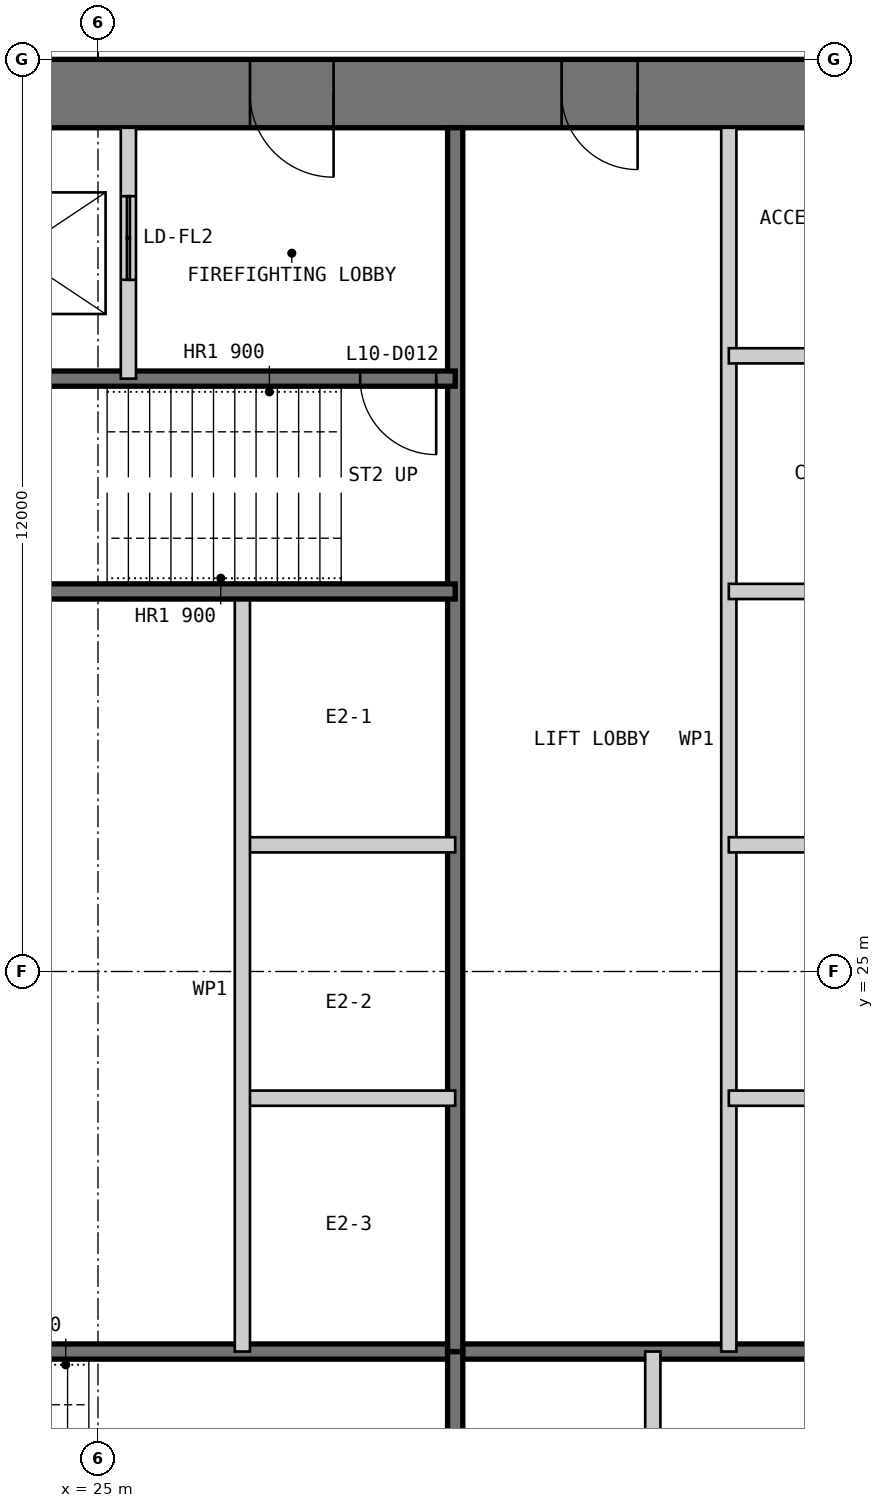
"""IFC4 building model, lengths in metres.
Left out: names, types, materials, properties, quantities, classifications, styles, units other than length and angle.
Written with IfcOpenShell. Run it as: python <this file> out.ifc"""

import sys

from ifc_helpers import new_model, si_unit, direction, frame, frame_2d, origin, place, context, subcontext, project, spatial, polyline, rectangle, outline, extrude, element, fill, save


model = new_model("IFC4")
c1 = context("Model", 3, precision=1e-05, world=origin(), true_north=direction((0.0, 1.0)))
c2 = subcontext(c1, "Body", "Model", "MODEL_VIEW")
j1 = project(units=[si_unit("LENGTHUNIT", "METRE"), si_unit("PLANEANGLEUNIT", "RADIAN")], contexts=[c1])
p1 = place(None, origin())
s1 = spatial("IfcSite", under=j1, at=p1, CompositionType="ELEMENT")
p2 = place(p1, origin())
s2 = spatial("IfcBuilding", under=s1, at=p2, CompositionType="ELEMENT")
p3 = place(p2, frame((0.0, 0.0, 47.0)))
s3 = spatial("IfcBuildingStorey", under=s2, at=p3, CompositionType="ELEMENT", Elevation=47.0)
p4 = place(p3, frame((37.0, 36.55, 0.0), z_axis=(0.0, 0.0, 1.0), x_axis=(-1.0, 0.0, 0.0)))
e1 = element("IfcWall", 1, at=p4, inside=s3, PredefinedType="SHEAR", context=c2, shape_type="SweptSolid", body=[
    extrude(outline(polyline([(0.0, -0.45), (24.0, -0.45), (23.1, 0.45), (0.9, 0.45), (0.0, -0.45)])), origin(), (0.0, 0.0, 1.0), 4.0),
])
p5 = place(p4, frame((4.9, 0.0, 0.0)))
e2 = element("IfcOpeningElement", 2, at=p5, cuts=e1, PredefinedType="OPENING", context=c2, shape_type="SweptSolid", body=[
    extrude(rectangle(XDim=1.0, YDim=2.2, at=frame_2d((0.5, 1.1))), frame((0.0, 0.46, 0.0), z_axis=(0.0, -1.0, 0.0), x_axis=(1.0, 0.0, 0.0)), (0.0, 0.0, 1.0), 0.92),
])
p6 = place(p4, frame((8.9, 0.0, 0.0)))
e3 = element("IfcOpeningElement", 3, at=p6, cuts=e1, PredefinedType="OPENING", context=c2, shape_type="SweptSolid", body=[
    extrude(rectangle(XDim=1.1, YDim=2.2, at=frame_2d((0.55, 1.1))), frame((0.0, 0.46, 0.0), z_axis=(0.0, -1.0, 0.0), x_axis=(1.0, 0.0, 0.0)), (0.0, 0.0, 1.0), 0.92),
])
p7 = place(p4, frame((15.05, 0.0, 0.0)))
e4 = element("IfcOpeningElement", 4, at=p7, cuts=e1, PredefinedType="OPENING", context=c2, shape_type="SweptSolid", body=[
    extrude(rectangle(XDim=0.9, YDim=2.2, at=frame_2d((0.45, 1.1))), frame((0.0, 0.46, 0.0), z_axis=(0.0, -1.0, 0.0), x_axis=(1.0, 0.0, 0.0)), (0.0, 0.0, 1.0), 0.92),
])
p8 = place(p4, frame((17.9, 0.0, 0.0)))
e5 = element("IfcOpeningElement", 5, at=p8, cuts=e1, PredefinedType="OPENING", context=c2, shape_type="SweptSolid", body=[
    extrude(rectangle(XDim=1.0, YDim=2.2, at=frame_2d((0.5, 1.1))), frame((0.0, 0.46, 0.0), z_axis=(0.0, -1.0, 0.0), x_axis=(1.0, 0.0, 0.0)), (0.0, 0.0, 1.0), 0.92),
])
p9 = place(p4, frame((21.4, 0.0, 0.0)))
e6 = element("IfcOpeningElement", 6, at=p9, cuts=e1, PredefinedType="OPENING", context=c2, shape_type="SweptSolid", body=[
    extrude(rectangle(XDim=1.0, YDim=2.2, at=frame_2d((0.5, 1.1))), frame((0.0, 0.46, 0.0), z_axis=(0.0, -1.0, 0.0), x_axis=(1.0, 0.0, 0.0)), (0.0, 0.0, 1.0), 0.92),
])
p10 = place(p3, frame((20.3, 20.0, 0.0), z_axis=(0.0, 0.0, 1.0), x_axis=(1.0, 0.0, 0.0)))
e7 = element("IfcWall", 7, at=p10, inside=s3, PredefinedType="SOLIDWALL", context=c2, shape_type="SweptSolid", body=[
    extrude(rectangle(XDim=15.8, YDim=0.2, at=frame_2d((7.9, 0.0))), origin(), (0.0, 0.0, 1.0), 3.8),
])
p11 = place(p3, frame((29.7, 13.9, 0.0), z_axis=(0.0, 0.0, 1.0), x_axis=(0.0, 1.0, 0.0)))
e8 = element("IfcWall", 8, at=p11, inside=s3, PredefinedType="SOLIDWALL", context=c2, shape_type="SweptSolid", body=[
    extrude(rectangle(XDim=6.1, YDim=0.2, at=frame_2d((3.05, 0.0))), origin(), (0.0, 0.0, 1.0), 3.8),
])
p12 = place(p3, frame((32.3, 13.9, 0.0), z_axis=(0.0, 0.0, 1.0), x_axis=(0.0, 1.0, 0.0)))
e9 = element("IfcWall", 9, at=p12, inside=s3, PredefinedType="PARTITIONING", context=c2, shape_type="SweptSolid", body=[
    extrude(rectangle(XDim=6.1, YDim=0.2, at=frame_2d((3.05, 0.0))), origin(), (0.0, 0.0, 1.0), 3.8),
])
p13 = place(p3, frame((33.3, 36.1, 0.0), z_axis=(0.0, 0.0, 1.0), x_axis=(0.0, -1.0, 0.0)))
e10 = element("IfcWall", 10, at=p13, inside=s3, PredefinedType="PARTITIONING", context=c2, shape_type="SweptSolid", body=[
    extrude(rectangle(XDim=16.1, YDim=0.2, at=frame_2d((8.05, 0.0))), origin(), (0.0, 0.0, 1.0), 3.8),
])
p14 = place(p3, frame((29.7, 36.1, 0.0), z_axis=(0.0, 0.0, 1.0), x_axis=(0.0, -1.0, 0.0)))
e11 = element("IfcWall", 11, at=p14, inside=s3, PredefinedType="SOLIDWALL", context=c2, shape_type="SweptSolid", body=[
    extrude(rectangle(XDim=16.1, YDim=0.2, at=frame_2d((8.05, 0.0))), origin(), (0.0, 0.0, 1.0), 3.8),
])
for number, where, z_axis, x_axis in (
    (12, (36.1, 30.0, 0.0), (0.0, 0.0, 1.0), (-1.0, 0.0, 0.0)),
    (13, (36.1, 26.667, 0.0), (0.0, 0.0, 1.0), (-1.0, 0.0, 0.0)),
    (14, (36.1, 23.333, 0.0), (0.0, 0.0, 1.0), (-1.0, 0.0, 0.0)),
    (15, (29.7, 26.667, 0.0), (0.0, 0.0, 1.0), (-1.0, 0.0, 0.0)),
    (16, (29.7, 23.333, 0.0), (0.0, 0.0, 1.0), (-1.0, 0.0, 0.0)),
):
    element("IfcWall", number, at=place(p3, frame(where, z_axis=z_axis, x_axis=x_axis)), inside=s3, PredefinedType="PARTITIONING", context=c2, shape_type="SweptSolid", body=[
        extrude(rectangle(XDim=2.8, YDim=0.2, at=frame_2d((1.4, 0.0))), origin(), (0.0, 0.0, 1.0), 3.8),
    ])
p15 = place(p3, frame((26.9, 30.0, 0.0), z_axis=(0.0, 0.0, 1.0), x_axis=(0.0, -1.0, 0.0)))
e17 = element("IfcWall", 17, at=p15, inside=s3, PredefinedType="PARTITIONING", context=c2, shape_type="SweptSolid", body=[
    extrude(rectangle(XDim=10.0, YDim=0.2, at=frame_2d((5.0, 0.0))), origin(), (0.0, 0.0, 1.0), 3.8),
])
p16 = place(p3, frame((29.7, 32.8, 0.0), z_axis=(0.0, 0.0, 1.0), x_axis=(-1.0, 0.0, 0.0)))
e18 = element("IfcWall", 18, at=p16, inside=s3, PredefinedType="SOLIDWALL", context=c2, shape_type="SweptSolid", body=[
    extrude(rectangle(XDim=9.4, YDim=0.2, at=frame_2d((4.7, 0.0))), origin(), (0.0, 0.0, 1.0), 3.8),
])
p17 = place(p16, frame((0.25, 0.0, 0.0)))
e19 = element("IfcOpeningElement", 19, at=p17, cuts=e18, PredefinedType="OPENING", context=c2, shape_type="SweptSolid", body=[
    extrude(rectangle(XDim=1.0, YDim=2.2, at=frame_2d((0.5, 1.1))), frame((0.0, 0.11, 0.0), z_axis=(0.0, -1.0, 0.0), x_axis=(1.0, 0.0, 0.0)), (0.0, 0.0, 1.0), 0.22),
])
p18 = place(p3, frame((29.7, 30.0, 0.0), z_axis=(0.0, 0.0, 1.0), x_axis=(-1.0, 0.0, 0.0)))
e20 = element("IfcWall", 20, at=p18, inside=s3, PredefinedType="SOLIDWALL", context=c2, shape_type="SweptSolid", body=[
    extrude(rectangle(XDim=15.8, YDim=0.2, at=frame_2d((7.9, 0.0))), origin(), (0.0, 0.0, 1.0), 3.8),
])
p19 = place(p3, frame((25.4, 36.1, 0.0), z_axis=(0.0, 0.0, 1.0), x_axis=(0.0, -1.0, 0.0)))
e21 = element("IfcWall", 21, at=p19, inside=s3, PredefinedType="PARTITIONING", context=c2, shape_type="SweptSolid", body=[
    extrude(rectangle(XDim=3.3, YDim=0.2, at=frame_2d((1.65, 0.0))), origin(), (0.0, 0.0, 1.0), 3.8),
])
p20 = place(p19, frame((0.9, 0.0, 0.0)))
e22 = element("IfcOpeningElement", 22, at=p20, cuts=e21, PredefinedType="OPENING", context=c2, shape_type="SweptSolid", body=[
    extrude(rectangle(XDim=1.1, YDim=2.2, at=frame_2d((0.55, 1.1))), frame((0.0, 0.11, 0.0), z_axis=(0.0, -1.0, 0.0), x_axis=(1.0, 0.0, 0.0)), (0.0, 0.0, 1.0), 0.22),
])
p21 = place(p3, frame((36.1, 33.1, 0.0), z_axis=(0.0, 0.0, 1.0), x_axis=(-1.0, 0.0, 0.0)))
e23 = element("IfcWall", 23, at=p21, inside=s3, PredefinedType="PARTITIONING", context=c2, shape_type="SweptSolid", body=[
    extrude(rectangle(XDim=2.8, YDim=0.2, at=frame_2d((1.4, 0.0))), origin(), (0.0, 0.0, 1.0), 3.8),
])
p22 = place(p5, origin())
e24 = element("IfcDoor", 24, at=p22, inside=s3, OperationType="SINGLE_SWING_LEFT", PredefinedType="DOOR", context=c2, shape_type="SweptSolid", body=[
    extrude(rectangle(XDim=1.0, YDim=2.2, at=frame_2d((0.5, 1.1))), frame((0.0, 0.025, 0.0), z_axis=(0.0, -1.0, 0.0), x_axis=(1.0, 0.0, 0.0)), (0.0, 0.0, 1.0), 0.05),
    extrude(outline(polyline([(0.0, 0.0), (0.04, 0.0), (0.04, 2.16), (0.96, 2.16), (0.96, 0.0), (1.0, 0.0), (1.0, 2.2), (0.0, 2.2), (0.0, 0.0)])), frame((0.0, 0.3, 0.0), z_axis=(0.0, -1.0, 0.0), x_axis=(1.0, 0.0, 0.0)), (0.0, 0.0, 1.0), 0.6),
])
fill(e2, e24)
p23 = place(p6, origin())
e25 = element("IfcDoor", 25, at=p23, inside=s3, OperationType="SINGLE_SWING_LEFT", PredefinedType="DOOR", context=c2, shape_type="SweptSolid", body=[
    extrude(rectangle(XDim=1.1, YDim=2.2, at=frame_2d((0.55, 1.1))), frame((0.0, 0.025, 0.0), z_axis=(0.0, -1.0, 0.0), x_axis=(1.0, 0.0, 0.0)), (0.0, 0.0, 1.0), 0.05),
    extrude(outline(polyline([(0.0, 0.0), (0.04, 0.0), (0.04, 2.16), (1.06, 2.16), (1.06, 0.0), (1.1, 0.0), (1.1, 2.2), (0.0, 2.2), (0.0, 0.0)])), frame((0.0, 0.3, 0.0), z_axis=(0.0, -1.0, 0.0), x_axis=(1.0, 0.0, 0.0)), (0.0, 0.0, 1.0), 0.6),
])
fill(e3, e25)
p24 = place(p17, origin())
e26 = element("IfcDoor", 26, at=p24, inside=s3, OperationType="SINGLE_SWING_LEFT", PredefinedType="DOOR", context=c2, shape_type="SweptSolid", body=[
    extrude(rectangle(XDim=1.0, YDim=2.2, at=frame_2d((0.5, 1.1))), frame((0.0, 0.025, 0.0), z_axis=(0.0, -1.0, 0.0), x_axis=(1.0, 0.0, 0.0)), (0.0, 0.0, 1.0), 0.05),
])
fill(e19, e26)
p25 = place(p20, origin())
e27 = element("IfcDoor", 27, at=p25, inside=s3, OperationType="DOUBLE_DOOR_SLIDING", PredefinedType="DOOR", context=c2, shape_type="SweptSolid", body=[
    extrude(rectangle(XDim=1.1, YDim=2.2, at=frame_2d((0.55, 1.1))), frame((0.0, 0.025, 0.0), z_axis=(0.0, -1.0, 0.0), x_axis=(1.0, 0.0, 0.0)), (0.0, 0.0, 1.0), 0.05),
])
fill(e22, e27)
save(model, sys.argv[1])
